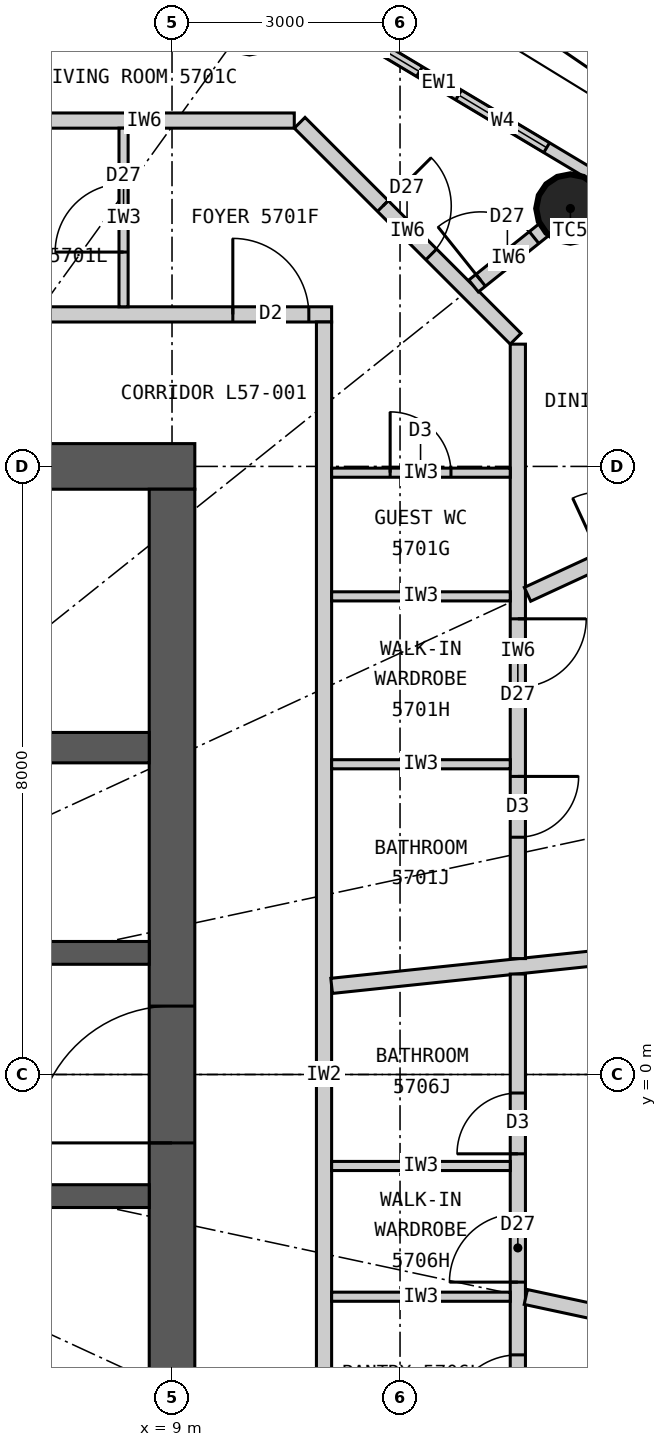
"""IFC4 building model, lengths in metres.
Left out: names, types, materials, properties, quantities, classifications, styles, units other than length and angle.
Written with IfcOpenShell. Run it as: python <this file> out.ifc"""

import sys

from ifc_helpers import new_model, si_unit, direction, frame, frame_2d, origin, origin_2d, place, context, subcontext, project, spatial, rectangle, circle, extrude, element, fill, save


model = new_model("IFC4")
c1 = context("Model", 3, precision=1e-05, world=origin(), true_north=direction((0.0, 1.0)))
c2 = subcontext(c1, "Body", "Model", "MODEL_VIEW")
j1 = project(units=[si_unit("LENGTHUNIT", "METRE"), si_unit("PLANEANGLEUNIT", "RADIAN")], contexts=[c1])
p1 = place(None, origin())
s1 = spatial("IfcSite", under=j1, at=p1, CompositionType="ELEMENT")
p2 = place(p1, origin())
s2 = spatial("IfcBuilding", under=s1, at=p2, CompositionType="ELEMENT")
p3 = place(p2, frame((0.0, 0.0, 212.7)))
s3 = spatial("IfcBuildingStorey", under=s2, at=p3, CompositionType="ELEMENT", Elevation=212.7)
for number, where, z_axis, x_axis in (
    (1, (14.241, 11.393, 0.0), (0.0, 0.0, 1.0), (1.0, 0.0, 0.0)),
    (2, (10.019, 13.883, 0.0), (0.0, 0.0, 1.0), (1.0, 0.0, 0.0)),
):
    element("IfcColumn", number, at=place(p3, frame(where, z_axis=z_axis, x_axis=x_axis)), inside=s3, PredefinedType="COLUMN", context=c2, shape_type="SweptSolid", body=[
        extrude(circle(Radius=0.45, at=origin_2d()), origin(), (0.0, 0.0, 1.0), 3.3),
    ])
p4 = place(p3, frame((-9.3, 8.0, 0.0), z_axis=(0.0, 0.0, 1.0), x_axis=(1.0, 0.0, 0.0)))
e3 = element("IfcWall", 3, at=p4, inside=s3, PredefinedType="SHEAR", context=c2, shape_type="SweptSolid", body=[
    extrude(rectangle(XDim=18.6, YDim=0.6, at=frame_2d((9.3, 0.0))), origin(), (0.0, 0.0, 1.0), 3.3),
])
p5 = place(p4, frame((8.0, 0.0, 0.0)))
e4 = element("IfcOpeningElement", 4, at=p5, cuts=e3, PredefinedType="OPENING", context=c2, shape_type="SweptSolid", body=[
    extrude(rectangle(XDim=1.2, YDim=2.2, at=frame_2d((0.6, 1.1))), frame((0.0, 0.31, 0.0), z_axis=(0.0, -1.0, 0.0), x_axis=(1.0, 0.0, 0.0)), (0.0, 0.0, 1.0), 0.62),
])
p6 = place(p4, frame((15.6, 0.0, 0.0)))
e5 = element("IfcOpeningElement", 5, at=p6, cuts=e3, PredefinedType="OPENING", context=c2, shape_type="SweptSolid", body=[
    extrude(rectangle(XDim=0.9, YDim=2.2, at=frame_2d((0.45, 1.1))), frame((0.0, 0.31, 0.0), z_axis=(0.0, -1.0, 0.0), x_axis=(1.0, 0.0, 0.0)), (0.0, 0.0, 1.0), 0.62),
])
p7 = place(p3, frame((9.0, -7.7, 0.0), z_axis=(0.0, 0.0, 1.0), x_axis=(0.0, 1.0, 0.0)))
e6 = element("IfcWall", 6, at=p7, inside=s3, PredefinedType="SHEAR", context=c2, shape_type="SweptSolid", body=[
    extrude(rectangle(XDim=15.4, YDim=0.6, at=frame_2d((7.7, 0.0))), origin(), (0.0, 0.0, 1.0), 3.3),
])
p8 = place(p7, frame((6.8, 0.0, 0.0)))
e7 = element("IfcOpeningElement", 7, at=p8, cuts=e6, PredefinedType="OPENING", context=c2, shape_type="SweptSolid", body=[
    extrude(rectangle(XDim=1.8, YDim=2.2, at=frame_2d((0.9, 1.1))), frame((0.0, 0.31, 0.0), z_axis=(0.0, -1.0, 0.0), x_axis=(1.0, 0.0, 0.0)), (0.0, 0.0, 1.0), 0.62),
])
p9 = place(p3, frame((-8.7, 4.3, 0.0), z_axis=(0.0, 0.0, 1.0), x_axis=(1.0, 0.0, 0.0)))
e8 = element("IfcWall", 8, at=p9, inside=s3, PredefinedType="SHEAR", context=c2, shape_type="SweptSolid", body=[
    extrude(rectangle(XDim=17.4, YDim=0.4, at=frame_2d((8.7, 0.0))), origin(), (0.0, 0.0, 1.0), 3.3),
])
p10 = place(p3, frame((-8.7, 1.6, 0.0), z_axis=(0.0, 0.0, 1.0), x_axis=(1.0, 0.0, 0.0)))
e9 = element("IfcWall", 9, at=p10, inside=s3, PredefinedType="SHEAR", context=c2, shape_type="SweptSolid", body=[
    extrude(rectangle(XDim=17.4, YDim=0.3, at=frame_2d((8.7, 0.0))), origin(), (0.0, 0.0, 1.0), 3.3),
])
p11 = place(p10, frame((12.65, 0.0, 0.0)))
e10 = element("IfcOpeningElement", 10, at=p11, cuts=e9, PredefinedType="OPENING", context=c2, shape_type="SweptSolid", body=[
    extrude(rectangle(XDim=1.1, YDim=2.2, at=frame_2d((0.55, 1.1))), frame((0.0, 0.16, 0.0), z_axis=(0.0, -1.0, 0.0), x_axis=(1.0, 0.0, 0.0)), (0.0, 0.0, 1.0), 0.32),
])
p12 = place(p10, frame((0.75, 0.0, 0.0)))
e11 = element("IfcOpeningElement", 11, at=p12, cuts=e9, PredefinedType="OPENING", context=c2, shape_type="SweptSolid", body=[
    extrude(rectangle(XDim=0.9, YDim=2.2, at=frame_2d((0.45, 1.1))), frame((0.0, 0.16, 0.0), z_axis=(0.0, -1.0, 0.0), x_axis=(1.0, 0.0, 0.0)), (0.0, 0.0, 1.0), 0.32),
])
p13 = place(p10, frame((6.75, 0.0, 0.0)))
e12 = element("IfcOpeningElement", 12, at=p13, cuts=e9, PredefinedType="OPENING", context=c2, shape_type="SweptSolid", body=[
    extrude(rectangle(XDim=0.9, YDim=2.2, at=frame_2d((0.45, 1.1))), frame((0.0, 0.16, 0.0), z_axis=(0.0, -1.0, 0.0), x_axis=(1.0, 0.0, 0.0)), (0.0, 0.0, 1.0), 0.32),
])
p14 = place(p3, frame((-8.7, -1.6, 0.0), z_axis=(0.0, 0.0, 1.0), x_axis=(1.0, 0.0, 0.0)))
e13 = element("IfcWall", 13, at=p14, inside=s3, PredefinedType="SHEAR", context=c2, shape_type="SweptSolid", body=[
    extrude(rectangle(XDim=17.4, YDim=0.3, at=frame_2d((8.7, 0.0))), origin(), (0.0, 0.0, 1.0), 3.3),
])
p15 = place(p14, frame((9.65, 0.0, 0.0)))
e14 = element("IfcOpeningElement", 14, at=p15, cuts=e13, PredefinedType="OPENING", context=c2, shape_type="SweptSolid", body=[
    extrude(rectangle(XDim=1.1, YDim=2.2, at=frame_2d((0.55, 1.1))), frame((0.0, 0.16, 0.0), z_axis=(0.0, -1.0, 0.0), x_axis=(1.0, 0.0, 0.0)), (0.0, 0.0, 1.0), 0.32),
])
p16 = place(p14, frame((12.4, 0.0, 0.0)))
e15 = element("IfcOpeningElement", 15, at=p16, cuts=e13, PredefinedType="OPENING", context=c2, shape_type="SweptSolid", body=[
    extrude(rectangle(XDim=1.6, YDim=2.4, at=frame_2d((0.8, 1.2))), frame((0.0, 0.16, 0.0), z_axis=(0.0, -1.0, 0.0), x_axis=(1.0, 0.0, 0.0)), (0.0, 0.0, 1.0), 0.32),
])
p17 = place(p14, frame((0.75, 0.0, 0.0)))
e16 = element("IfcOpeningElement", 16, at=p17, cuts=e13, PredefinedType="OPENING", context=c2, shape_type="SweptSolid", body=[
    extrude(rectangle(XDim=0.9, YDim=2.2, at=frame_2d((0.45, 1.1))), frame((0.0, 0.16, 0.0), z_axis=(0.0, -1.0, 0.0), x_axis=(1.0, 0.0, 0.0)), (0.0, 0.0, 1.0), 0.32),
])
p18 = place(p14, frame((5.25, 0.0, 0.0)))
e17 = element("IfcOpeningElement", 17, at=p18, cuts=e13, PredefinedType="OPENING", context=c2, shape_type="SweptSolid", body=[
    extrude(rectangle(XDim=0.9, YDim=2.2, at=frame_2d((0.45, 1.1))), frame((0.0, 0.16, 0.0), z_axis=(0.0, -1.0, 0.0), x_axis=(1.0, 0.0, 0.0)), (0.0, 0.0, 1.0), 0.32),
])
p19 = place(p3, frame((14.68, 11.744, 0.0), z_axis=(0.0, 0.0, 1.0), x_axis=(-0.85822150553, 0.513279502265, 0.0)))
e18 = element("IfcWall", 18, at=p19, inside=s3, PredefinedType="ELEMENTEDWALL", context=c2, shape_type="SweptSolid", body=[
    extrude(rectangle(XDim=5.05, YDim=0.15, at=frame_2d((2.525, 0.0))), origin(), (0.0, 0.0, 1.0), 3.12),
])
p20 = place(p19, frame((0.875, 0.0, 0.9)))
e19 = element("IfcOpeningElement", 19, at=p20, cuts=e18, PredefinedType="OPENING", context=c2, shape_type="SweptSolid", body=[
    extrude(rectangle(XDim=1.35, YDim=1.9, at=frame_2d((0.675, 0.95))), frame((0.0, 0.085, 0.0), z_axis=(0.0, -1.0, 0.0), x_axis=(1.0, 0.0, 0.0)), (0.0, 0.0, 1.0), 0.17),
])
p21 = place(p19, frame((2.825, 0.0, 0.9)))
e20 = element("IfcOpeningElement", 20, at=p21, cuts=e18, PredefinedType="OPENING", context=c2, shape_type="SweptSolid", body=[
    extrude(rectangle(XDim=1.35, YDim=1.9, at=frame_2d((0.675, 0.95))), frame((0.0, 0.085, 0.0), z_axis=(0.0, -1.0, 0.0), x_axis=(1.0, 0.0, 0.0)), (0.0, 0.0, 1.0), 0.17),
])
p22 = place(p3, frame((-11.1, 10.0, 0.0), z_axis=(0.0, 0.0, 1.0), x_axis=(1.0, 0.0, 0.0)))
e21 = element("IfcWall", 21, at=p22, inside=s3, PredefinedType="PARTITIONING", context=c2, shape_type="SweptSolid", body=[
    extrude(rectangle(XDim=22.2, YDim=0.2, at=frame_2d((11.1, 0.0))), origin(), (0.0, 0.0, 1.0), 3.12),
])
p23 = place(p22, frame((20.9, 0.0, 0.0)))
e22 = element("IfcOpeningElement", 22, at=p23, cuts=e21, PredefinedType="OPENING", context=c2, shape_type="SweptSolid", body=[
    extrude(rectangle(XDim=1.0, YDim=2.2, at=frame_2d((0.5, 1.1))), frame((0.0, 0.11, 0.0), z_axis=(0.0, -1.0, 0.0), x_axis=(1.0, 0.0, 0.0)), (0.0, 0.0, 1.0), 0.22),
])
p24 = place(p22, frame((4.329, 0.0, 0.0)))
e23 = element("IfcOpeningElement", 23, at=p24, cuts=e21, PredefinedType="OPENING", context=c2, shape_type="SweptSolid", body=[
    extrude(rectangle(XDim=1.0, YDim=2.2, at=frame_2d((0.5, 1.1))), frame((0.0, 0.11, 0.0), z_axis=(0.0, -1.0, 0.0), x_axis=(1.0, 0.0, 0.0)), (0.0, 0.0, 1.0), 0.22),
])
p25 = place(p3, frame((11.0, -9.9, 0.0), z_axis=(0.0, 0.0, 1.0), x_axis=(0.0, 1.0, 0.0)))
e24 = element("IfcWall", 24, at=p25, inside=s3, PredefinedType="PARTITIONING", context=c2, shape_type="SweptSolid", body=[
    extrude(rectangle(XDim=19.8, YDim=0.2, at=frame_2d((9.9, 0.0))), origin(), (0.0, 0.0, 1.0), 3.12),
])
p26 = place(p3, frame((11.1, 1.166, 0.0), z_axis=(0.0, 0.0, 1.0), x_axis=(0.994527487125, 0.104475247564, 0.0)))
e25 = element("IfcWall", 25, at=p26, inside=s3, PredefinedType="PARTITIONING", context=c2, shape_type="SweptSolid", body=[
    extrude(rectangle(XDim=9.401, YDim=0.2, at=frame_2d((4.701, 0.0))), origin(), (0.0, 0.0, 1.0), 2.47),
])
p27 = place(p3, frame((5.241, 10.1, 0.0), z_axis=(0.0, 0.0, 1.0), x_axis=(0.460603196597, 0.887606160008, 0.0)))
e26 = element("IfcWall", 26, at=p27, inside=s3, PredefinedType="PARTITIONING", context=c2, shape_type="SweptSolid", body=[
    extrude(rectangle(XDim=5.58, YDim=0.2, at=frame_2d((2.79, 0.0))), origin(), (0.0, 0.0, 1.0), 3.12),
])
p28 = place(p3, frame((13.55, 1.525, 0.0), z_axis=(0.0, 0.0, 1.0), x_axis=(0.0, 1.0, 0.0)))
e27 = element("IfcWall", 27, at=p28, inside=s3, PredefinedType="PARTITIONING", context=c2, shape_type="SweptSolid", body=[
    extrude(rectangle(XDim=8.084, YDim=0.2, at=frame_2d((4.042, 0.0))), origin(), (0.0, 0.0, 1.0), 3.12),
])
p29 = place(p28, frame((1.597, 0.0, 0.0)))
e28 = element("IfcOpeningElement", 28, at=p29, cuts=e27, PredefinedType="OPENING", context=c2, shape_type="SweptSolid", body=[
    extrude(rectangle(XDim=0.8, YDim=2.1, at=frame_2d((0.4, 1.05))), frame((0.0, 0.11, 0.0), z_axis=(0.0, -1.0, 0.0), x_axis=(1.0, 0.0, 0.0)), (0.0, 0.0, 1.0), 0.22),
])
p30 = place(p28, frame((3.57, 0.0, 0.0)))
e29 = element("IfcOpeningElement", 29, at=p30, cuts=e27, PredefinedType="OPENING", context=c2, shape_type="SweptSolid", body=[
    extrude(rectangle(XDim=0.9, YDim=2.1, at=frame_2d((0.45, 1.05))), frame((0.0, 0.11, 0.0), z_axis=(0.0, -1.0, 0.0), x_axis=(1.0, 0.0, 0.0)), (0.0, 0.0, 1.0), 0.22),
])
p31 = place(p3, frame((13.521, 9.679, 0.0), z_axis=(0.0, 0.0, 1.0), x_axis=(-0.707106781187, 0.707106781187, 0.0)))
e30 = element("IfcWall", 30, at=p31, inside=s3, PredefinedType="PARTITIONING", context=c2, shape_type="SweptSolid", body=[
    extrude(rectangle(XDim=4.019, YDim=0.2, at=frame_2d((2.009, 0.0))), origin(), (0.0, 0.0, 1.0), 3.12),
])
p32 = place(p31, frame((1.57, 0.0, 0.0)))
e31 = element("IfcOpeningElement", 31, at=p32, cuts=e30, PredefinedType="OPENING", context=c2, shape_type="SweptSolid", body=[
    extrude(rectangle(XDim=0.9, YDim=2.1, at=frame_2d((0.45, 1.05))), frame((0.0, 0.11, 0.0), z_axis=(0.0, -1.0, 0.0), x_axis=(1.0, 0.0, 0.0)), (0.0, 0.0, 1.0), 0.22),
])
p33 = place(p3, frame((10.609, 12.55, 0.0), z_axis=(0.0, 0.0, 1.0), x_axis=(-1.0, 0.0, 0.0)))
e32 = element("IfcWall", 32, at=p33, inside=s3, PredefinedType="PARTITIONING", context=c2, shape_type="SweptSolid", body=[
    extrude(rectangle(XDim=3.947, YDim=0.2, at=frame_2d((1.974, 0.0))), origin(), (0.0, 0.0, 1.0), 3.12),
])
p34 = place(p3, frame((13.677, 6.317, 0.0), z_axis=(0.0, 0.0, 1.0), x_axis=(0.907825704695, 0.419347695708, 0.0)))
e33 = element("IfcWall", 33, at=p34, inside=s3, PredefinedType="PARTITIONING", context=c2, shape_type="SweptSolid", body=[
    extrude(rectangle(XDim=3.796, YDim=0.2, at=frame_2d((1.898, 0.0))), origin(), (0.0, 0.0, 1.0), 2.32),
])
p35 = place(p34, frame((1.07, 0.0, 0.0)))
e34 = element("IfcOpeningElement", 34, at=p35, cuts=e33, PredefinedType="OPENING", context=c2, shape_type="SweptSolid", body=[
    extrude(rectangle(XDim=0.9, YDim=2.1, at=frame_2d((0.45, 1.05))), frame((0.0, 0.11, 0.0), z_axis=(0.0, -1.0, 0.0), x_axis=(1.0, 0.0, 0.0)), (0.0, 0.0, 1.0), 0.22),
])
p36 = place(p3, frame((12.968, 10.374, 0.0), z_axis=(0.0, 0.0, 1.0), x_axis=(0.780888968944, 0.624669847345, 0.0)))
e35 = element("IfcWall", 35, at=p36, inside=s3, PredefinedType="PARTITIONING", context=c2, shape_type="SweptSolid", body=[
    extrude(rectangle(XDim=1.181, YDim=0.2, at=frame_2d((0.591, 0.0))), origin(), (0.0, 0.0, 1.0), 2.42),
])
p37 = place(p36, frame((0.12, 0.0, 0.0)))
e36 = element("IfcOpeningElement", 36, at=p37, cuts=e35, PredefinedType="OPENING", context=c2, shape_type="SweptSolid", body=[
    extrude(rectangle(XDim=0.9, YDim=2.1, at=frame_2d((0.45, 1.05))), frame((0.0, 0.11, 0.0), z_axis=(0.0, -1.0, 0.0), x_axis=(1.0, 0.0, 0.0)), (0.0, 0.0, 1.0), 0.22),
])
for number, where, z_axis, x_axis in (
    (37, (11.1, 4.082, 0.0), (0.0, 0.0, 1.0), (1.0, 0.0, 0.0)),
    (38, (11.1, 6.29, 0.0), (0.0, 0.0, 1.0), (1.0, 0.0, 0.0)),
):
    element("IfcWall", number, at=place(p3, frame(where, z_axis=z_axis, x_axis=x_axis)), inside=s3, PredefinedType="PARTITIONING", context=c2, shape_type="SweptSolid", body=[
        extrude(rectangle(XDim=2.35, YDim=0.12, at=frame_2d((1.175, 0.0))), origin(), (0.0, 0.0, 1.0), 3.12),
    ])
p38 = place(p3, frame((11.1, 7.917, 0.0), z_axis=(0.0, 0.0, 1.0), x_axis=(1.0, 0.0, 0.0)))
e39 = element("IfcWall", 39, at=p38, inside=s3, PredefinedType="PARTITIONING", context=c2, shape_type="SweptSolid", body=[
    extrude(rectangle(XDim=2.35, YDim=0.12, at=frame_2d((1.175, 0.0))), origin(), (0.0, 0.0, 1.0), 3.12),
])
p39 = place(p38, frame((0.77, 0.0, 0.0)))
e40 = element("IfcOpeningElement", 40, at=p39, cuts=e39, PredefinedType="OPENING", context=c2, shape_type="SweptSolid", body=[
    extrude(rectangle(XDim=0.8, YDim=2.1, at=frame_2d((0.4, 1.05))), frame((0.0, 0.07, 0.0), z_axis=(0.0, -1.0, 0.0), x_axis=(1.0, 0.0, 0.0)), (0.0, 0.0, 1.0), 0.14),
])
p40 = place(p3, frame((8.363, 10.1, 0.0), z_axis=(0.0, 0.0, 1.0), x_axis=(0.0, 1.0, 0.0)))
e41 = element("IfcWall", 41, at=p40, inside=s3, PredefinedType="PARTITIONING", context=c2, shape_type="SweptSolid", body=[
    extrude(rectangle(XDim=2.35, YDim=0.12, at=frame_2d((1.175, 0.0))), origin(), (0.0, 0.0, 1.0), 3.12),
])
p41 = place(p40, frame((0.72, 0.0, 0.0)))
e42 = element("IfcOpeningElement", 42, at=p41, cuts=e41, PredefinedType="OPENING", context=c2, shape_type="SweptSolid", body=[
    extrude(rectangle(XDim=0.9, YDim=2.1, at=frame_2d((0.45, 1.05))), frame((0.0, 0.07, 0.0), z_axis=(0.0, -1.0, 0.0), x_axis=(1.0, 0.0, 0.0)), (0.0, 0.0, 1.0), 0.14),
])
p42 = place(p3, frame((13.55, -9.609, 0.0), z_axis=(0.0, 0.0, 1.0), x_axis=(0.0, 1.0, 0.0)))
e43 = element("IfcWall", 43, at=p42, inside=s3, PredefinedType="PARTITIONING", context=c2, shape_type="SweptSolid", body=[
    extrude(rectangle(XDim=10.93, YDim=0.2, at=frame_2d((5.465, 0.0))), origin(), (0.0, 0.0, 1.0), 3.12),
])
p43 = place(p42, frame((5.02, 0.0, 0.0)))
e44 = element("IfcOpeningElement", 44, at=p43, cuts=e43, PredefinedType="OPENING", context=c2, shape_type="SweptSolid", body=[
    extrude(rectangle(XDim=0.9, YDim=2.1, at=frame_2d((0.45, 1.05))), frame((0.0, 0.11, 0.0), z_axis=(0.0, -1.0, 0.0), x_axis=(1.0, 0.0, 0.0)), (0.0, 0.0, 1.0), 0.22),
])
p44 = place(p42, frame((6.877, 0.0, 0.0)))
e45 = element("IfcOpeningElement", 45, at=p44, cuts=e43, PredefinedType="OPENING", context=c2, shape_type="SweptSolid", body=[
    extrude(rectangle(XDim=0.9, YDim=2.1, at=frame_2d((0.45, 1.05))), frame((0.0, 0.11, 0.0), z_axis=(0.0, -1.0, 0.0), x_axis=(1.0, 0.0, 0.0)), (0.0, 0.0, 1.0), 0.22),
])
p45 = place(p42, frame((8.565, 0.0, 0.0)))
e46 = element("IfcOpeningElement", 46, at=p45, cuts=e43, PredefinedType="OPENING", context=c2, shape_type="SweptSolid", body=[
    extrude(rectangle(XDim=0.8, YDim=2.1, at=frame_2d((0.4, 1.05))), frame((0.0, 0.11, 0.0), z_axis=(0.0, -1.0, 0.0), x_axis=(1.0, 0.0, 0.0)), (0.0, 0.0, 1.0), 0.22),
])
p46 = place(p3, frame((13.655, -2.927, 0.0), z_axis=(0.0, 0.0, 1.0), x_axis=(0.977790419294, -0.209585056568, 0.0)))
e47 = element("IfcWall", 47, at=p46, inside=s3, PredefinedType="PARTITIONING", context=c2, shape_type="SweptSolid", body=[
    extrude(rectangle(XDim=5.66, YDim=0.2, at=frame_2d((2.83, 0.0))), origin(), (0.0, 0.0, 1.0), 2.42),
])
p47 = place(p46, frame((1.82, 0.0, 0.0)))
e48 = element("IfcOpeningElement", 48, at=p47, cuts=e47, PredefinedType="OPENING", context=c2, shape_type="SweptSolid", body=[
    extrude(rectangle(XDim=0.9, YDim=2.1, at=frame_2d((0.45, 1.05))), frame((0.0, 0.11, 0.0), z_axis=(0.0, -1.0, 0.0), x_axis=(1.0, 0.0, 0.0)), (0.0, 0.0, 1.0), 0.22),
])
p48 = place(p3, frame((11.1, -2.924, 0.0), z_axis=(0.0, 0.0, 1.0), x_axis=(1.0, 0.0, 0.0)))
e49 = element("IfcWall", 49, at=p48, inside=s3, PredefinedType="PARTITIONING", context=c2, shape_type="SweptSolid", body=[
    extrude(rectangle(XDim=2.35, YDim=0.12, at=frame_2d((1.175, 0.0))), origin(), (0.0, 0.0, 1.0), 2.42),
])
p49 = place(p3, frame((11.1, -1.204, 0.0), z_axis=(0.0, 0.0, 1.0), x_axis=(1.0, 0.0, 0.0)))
e50 = element("IfcWall", 50, at=p49, inside=s3, PredefinedType="PARTITIONING", context=c2, shape_type="SweptSolid", body=[
    extrude(rectangle(XDim=2.35, YDim=0.12, at=frame_2d((1.175, 0.0))), origin(), (0.0, 0.0, 1.0), 3.12),
])
p50 = place(p20, origin())
e51 = element("IfcWindow", 51, at=p50, inside=s3, PartitioningType="SINGLE_PANEL", PredefinedType="WINDOW", context=c2, shape_type="SweptSolid", body=[
    extrude(rectangle(XDim=1.35, YDim=1.9, at=frame_2d((0.675, 0.95))), frame((0.0, 0.03, 0.0), z_axis=(0.0, -1.0, 0.0), x_axis=(1.0, 0.0, 0.0)), (0.0, 0.0, 1.0), 0.06),
])
fill(e19, e51)
p51 = place(p21, origin())
e52 = element("IfcWindow", 52, at=p51, inside=s3, PartitioningType="SINGLE_PANEL", PredefinedType="WINDOW", context=c2, shape_type="SweptSolid", body=[
    extrude(rectangle(XDim=1.35, YDim=1.9, at=frame_2d((0.675, 0.95))), frame((0.0, 0.03, 0.0), z_axis=(0.0, -1.0, 0.0), x_axis=(1.0, 0.0, 0.0)), (0.0, 0.0, 1.0), 0.06),
])
fill(e20, e52)
p52 = place(p23, origin())
e53 = element("IfcDoor", 53, at=p52, inside=s3, OperationType="SINGLE_SWING_LEFT", PredefinedType="DOOR", context=c2, shape_type="SweptSolid", body=[
    extrude(rectangle(XDim=1.0, YDim=2.2, at=frame_2d((0.5, 1.1))), frame((0.0, 0.025, 0.0), z_axis=(0.0, -1.0, 0.0), x_axis=(1.0, 0.0, 0.0)), (0.0, 0.0, 1.0), 0.05),
])
fill(e22, e53)
p53 = place(p29, origin())
e54 = element("IfcDoor", 54, at=p53, inside=s3, OperationType="SINGLE_SWING_RIGHT", PredefinedType="DOOR", context=c2, shape_type="SweptSolid", body=[
    extrude(rectangle(XDim=0.8, YDim=2.1, at=frame_2d((0.4, 1.05))), frame((0.0, 0.025, 0.0), z_axis=(0.0, -1.0, 0.0), x_axis=(1.0, 0.0, 0.0)), (0.0, 0.0, 1.0), 0.05),
])
fill(e28, e54)
p54 = place(p30, origin())
e55 = element("IfcDoor", 55, at=p54, inside=s3, OperationType="SINGLE_SWING_RIGHT", PredefinedType="DOOR", context=c2, shape_type="SweptSolid", body=[
    extrude(rectangle(XDim=0.9, YDim=2.1, at=frame_2d((0.45, 1.05))), frame((0.0, 0.025, 0.0), z_axis=(0.0, -1.0, 0.0), x_axis=(1.0, 0.0, 0.0)), (0.0, 0.0, 1.0), 0.05),
])
fill(e29, e55)
p55 = place(p39, origin())
e56 = element("IfcDoor", 56, at=p55, inside=s3, OperationType="SINGLE_SWING_LEFT", PredefinedType="DOOR", context=c2, shape_type="SweptSolid", body=[
    extrude(rectangle(XDim=0.8, YDim=2.1, at=frame_2d((0.4, 1.05))), frame((0.0, 0.025, 0.0), z_axis=(0.0, -1.0, 0.0), x_axis=(1.0, 0.0, 0.0)), (0.0, 0.0, 1.0), 0.05),
])
fill(e40, e56)
p56 = place(p41, origin())
e57 = element("IfcDoor", 57, at=p56, inside=s3, OperationType="SINGLE_SWING_LEFT", PredefinedType="DOOR", context=c2, shape_type="SweptSolid", body=[
    extrude(rectangle(XDim=0.9, YDim=2.1, at=frame_2d((0.45, 1.05))), frame((0.0, 0.025, 0.0), z_axis=(0.0, -1.0, 0.0), x_axis=(1.0, 0.0, 0.0)), (0.0, 0.0, 1.0), 0.05),
])
fill(e42, e57)
p57 = place(p32, origin())
e58 = element("IfcDoor", 58, at=p57, inside=s3, OperationType="SINGLE_SWING_RIGHT", PredefinedType="DOOR", context=c2, shape_type="SweptSolid", body=[
    extrude(rectangle(XDim=0.9, YDim=2.1, at=frame_2d((0.45, 1.05))), frame((0.0, 0.025, 0.0), z_axis=(0.0, -1.0, 0.0), x_axis=(1.0, 0.0, 0.0)), (0.0, 0.0, 1.0), 0.05),
])
fill(e31, e58)
p58 = place(p37, origin())
e59 = element("IfcDoor", 59, at=p58, inside=s3, OperationType="SINGLE_SWING_LEFT", PredefinedType="DOOR", context=c2, shape_type="SweptSolid", body=[
    extrude(rectangle(XDim=0.9, YDim=2.1, at=frame_2d((0.45, 1.05))), frame((0.0, 0.025, 0.0), z_axis=(0.0, -1.0, 0.0), x_axis=(1.0, 0.0, 0.0)), (0.0, 0.0, 1.0), 0.05),
])
fill(e36, e59)
p59 = place(p43, origin())
e60 = element("IfcDoor", 60, at=p59, inside=s3, OperationType="SINGLE_SWING_LEFT", PredefinedType="DOOR", context=c2, shape_type="SweptSolid", body=[
    extrude(rectangle(XDim=0.9, YDim=2.1, at=frame_2d((0.45, 1.05))), frame((0.0, 0.025, 0.0), z_axis=(0.0, -1.0, 0.0), x_axis=(1.0, 0.0, 0.0)), (0.0, 0.0, 1.0), 0.05),
])
fill(e44, e60)
p60 = place(p44, origin())
e61 = element("IfcDoor", 61, at=p60, inside=s3, OperationType="SINGLE_SWING_LEFT", PredefinedType="DOOR", context=c2, shape_type="SweptSolid", body=[
    extrude(rectangle(XDim=0.9, YDim=2.1, at=frame_2d((0.45, 1.05))), frame((0.0, 0.025, 0.0), z_axis=(0.0, -1.0, 0.0), x_axis=(1.0, 0.0, 0.0)), (0.0, 0.0, 1.0), 0.05),
])
fill(e45, e61)
p61 = place(p45, origin())
e62 = element("IfcDoor", 62, at=p61, inside=s3, OperationType="SINGLE_SWING_LEFT", PredefinedType="DOOR", context=c2, shape_type="SweptSolid", body=[
    extrude(rectangle(XDim=0.8, YDim=2.1, at=frame_2d((0.4, 1.05))), frame((0.0, 0.025, 0.0), z_axis=(0.0, -1.0, 0.0), x_axis=(1.0, 0.0, 0.0)), (0.0, 0.0, 1.0), 0.05),
])
fill(e46, e62)
p62 = place(p8, origin())
e63 = element("IfcDoor", 63, at=p62, inside=s3, OperationType="DOUBLE_DOOR_DOUBLE_SWING", PredefinedType="DOOR", context=c2, shape_type="SweptSolid", body=[
    extrude(rectangle(XDim=1.8, YDim=2.2, at=frame_2d((0.9, 1.1))), frame((0.0, 0.025, 0.0), z_axis=(0.0, -1.0, 0.0), x_axis=(1.0, 0.0, 0.0)), (0.0, 0.0, 1.0), 0.05),
])
fill(e7, e63)
save(model, sys.argv[1])
